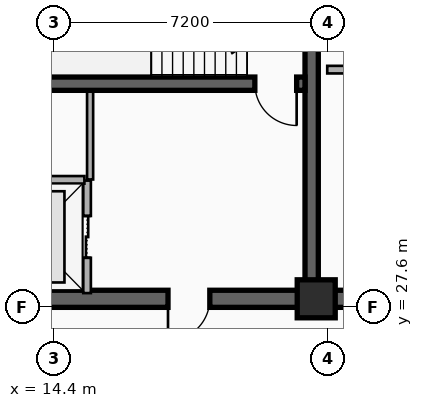
"""IFC4 building model, lengths in metres.
Left out: names, types, materials, properties, quantities, classifications, styles, units other than length and angle.
Written with IfcOpenShell. Run it as: python <this file> out.ifc"""

import sys

from ifc_helpers import new_model, si_unit, direction, frame, frame_2d, origin, origin_2d, place, context, subcontext, project, spatial, rectangle, extrude, element, fill, save


model = new_model("IFC4")
c1 = context("Model", 3, precision=1e-05, world=origin(), true_north=direction((0.0, 1.0)))
c2 = subcontext(c1, "Body", "Model", "MODEL_VIEW")
j1 = project(units=[si_unit("LENGTHUNIT", "METRE"), si_unit("PLANEANGLEUNIT", "RADIAN")], contexts=[c1])
p1 = place(None, origin())
s1 = spatial("IfcSite", under=j1, at=p1, CompositionType="ELEMENT")
p2 = place(p1, origin())
s2 = spatial("IfcBuilding", under=s1, at=p2, CompositionType="ELEMENT")
p3 = place(p2, frame((0.0, 0.0, 218.4)))
s3 = spatial("IfcBuildingStorey", under=s2, at=p3, CompositionType="ELEMENT", Elevation=218.4)
p4 = place(p3, frame((21.18, 27.82, 0.0), z_axis=(0.0, 0.0, 1.0), x_axis=(-1.0, 0.0, 0.0)))
e1 = element("IfcWall", 1, at=p4, inside=s3, PredefinedType="SHEAR", context=c2, shape_type="SweptSolid", body=[
    extrude(rectangle(XDim=9.03, YDim=0.45, at=frame_2d((4.515, 0.0))), origin(), (0.0, 0.0, 1.0), 3.6),
])
p5 = place(p4, frame((2.68, 0.0, 0.0)))
e2 = element("IfcOpeningElement", 2, at=p5, cuts=e1, PredefinedType="OPENING", context=c2, shape_type="SweptSolid", body=[
    extrude(rectangle(XDim=1.1, YDim=2.15, at=frame_2d((0.55, 1.075))), frame((0.0, 0.235, 0.0), z_axis=(0.0, -1.0, 0.0), x_axis=(1.0, 0.0, 0.0)), (0.0, 0.0, 1.0), 0.47),
])
p6 = place(p3, frame((33.15, 27.82, 0.0), z_axis=(0.0, 0.0, 1.0), x_axis=(-1.0, 0.0, 0.0)))
e3 = element("IfcWall", 3, at=p6, inside=s3, PredefinedType="SHEAR", context=c2, shape_type="SweptSolid", body=[
    extrude(rectangle(XDim=11.97, YDim=0.45, at=frame_2d((5.985, 0.0))), origin(), (0.0, 0.0, 1.0), 3.6),
])
p7 = place(p6, frame((6.1, 0.0, 0.0)))
e4 = element("IfcOpeningElement", 4, at=p7, cuts=e3, PredefinedType="OPENING", context=c2, shape_type="SweptSolid", body=[
    extrude(rectangle(XDim=1.6, YDim=2.2, at=frame_2d((0.8, 1.1))), frame((0.0, 0.235, 0.0), z_axis=(0.0, -1.0, 0.0), x_axis=(1.0, 0.0, 0.0)), (0.0, 0.0, 1.0), 0.47),
])
p8 = place(p3, frame((21.18, 28.045, 0.0), z_axis=(0.0, 0.0, 1.0), x_axis=(0.0, 1.0, 0.0)))
e5 = element("IfcWall", 5, at=p8, inside=s3, PredefinedType="SHEAR", context=c2, shape_type="SweptSolid", body=[
    extrude(rectangle(XDim=8.78, YDim=0.35, at=frame_2d((4.39, 0.0))), origin(), (0.0, 0.0, 1.0), 3.6),
])
p9 = place(p3, frame((21.005, 33.48, 0.0), z_axis=(0.0, 0.0, 1.0), x_axis=(-1.0, 0.0, 0.0)))
e6 = element("IfcWall", 6, at=p9, inside=s3, PredefinedType="SHEAR", context=c2, shape_type="SweptSolid", body=[
    extrude(rectangle(XDim=8.63, YDim=0.35, at=frame_2d((4.315, 0.0))), origin(), (0.0, 0.0, 1.0), 3.6),
])
p10 = place(p9, frame((0.22, 0.0, 0.0)))
e7 = element("IfcOpeningElement", 7, at=p10, cuts=e6, PredefinedType="OPENING", context=c2, shape_type="SweptSolid", body=[
    extrude(rectangle(XDim=1.1, YDim=2.15, at=frame_2d((0.55, 1.075))), frame((0.0, 0.185, 0.0), z_axis=(0.0, -1.0, 0.0), x_axis=(1.0, 0.0, 0.0)), (0.0, 0.0, 1.0), 0.37),
])
p11 = place(p3, frame((21.3, 27.82, 0.0), z_axis=(0.0, 0.0, 1.0), x_axis=(1.0, 0.0, 0.0)))
e8 = element("IfcColumn", 8, at=p11, inside=s3, PredefinedType="COLUMN", context=c2, shape_type="SweptSolid", body=[
    extrude(rectangle(XDim=1.0, YDim=1.0, at=origin_2d()), origin(), (0.0, 0.0, 1.0), 3.6),
])
p12 = place(p3, frame((15.27, 27.97, 0.0), z_axis=(0.0, 0.0, 1.0), x_axis=(0.0, 1.0, 0.0)))
e9 = element("IfcWall", 9, at=p12, inside=s3, PredefinedType="PARTITIONING", context=c2, shape_type="SweptSolid", body=[
    extrude(rectangle(XDim=2.96, YDim=0.2, at=frame_2d((1.48, 0.0))), origin(), (0.0, 0.0, 1.0), 2.41),
])
p13 = place(p12, frame((0.93, 0.0, 0.0)))
e10 = element("IfcOpeningElement", 10, at=p13, cuts=e9, PredefinedType="OPENING", context=c2, shape_type="SweptSolid", body=[
    extrude(rectangle(XDim=1.1, YDim=2.15, at=frame_2d((0.55, 1.075))), frame((0.0, 0.11, 0.0), z_axis=(0.0, -1.0, 0.0), x_axis=(1.0, 0.0, 0.0)), (0.0, 0.0, 1.0), 0.22),
])
p14 = place(p3, frame((12.45, 30.95, 0.0), z_axis=(0.0, 0.0, 1.0), x_axis=(1.0, 0.0, 0.0)))
e11 = element("IfcWall", 11, at=p14, inside=s3, PredefinedType="PARTITIONING", context=c2, shape_type="SweptSolid", body=[
    extrude(rectangle(XDim=2.75, YDim=0.2, at=frame_2d((1.375, 0.0))), origin(), (0.0, 0.0, 1.0), 2.41),
])
p15 = place(p3, frame((21.59, 33.85, 0.0), z_axis=(0.0, 0.0, 1.0), x_axis=(1.0, 0.0, 0.0)))
e12 = element("IfcWall", 12, at=p15, inside=s3, PredefinedType="PARTITIONING", context=c2, shape_type="SweptSolid", body=[
    extrude(rectangle(XDim=1.97, YDim=0.2, at=frame_2d((0.985, 0.0))), origin(), (0.0, 0.0, 1.0), 2.41),
])
p16 = place(p3, frame((15.35, 30.96, 0.0), z_axis=(0.0, 0.0, 1.0), x_axis=(0.0, 1.0, 0.0)))
e13 = element("IfcWall", 13, at=p16, inside=s3, PredefinedType="PARTITIONING", context=c2, shape_type="SweptSolid", body=[
    extrude(rectangle(XDim=2.31, YDim=0.16, at=frame_2d((1.155, 0.0))), origin(), (0.0, 0.0, 1.0), 3.34),
])
p17 = place(p13, origin())
e14 = element("IfcDoor", 14, at=p17, inside=s3, OperationType="DOUBLE_DOOR_SLIDING", PredefinedType="DOOR", context=c2, shape_type="SweptSolid", body=[
    extrude(rectangle(XDim=1.1, YDim=2.15, at=frame_2d((0.55, 1.075))), frame((0.0, 0.025, 0.0), z_axis=(0.0, -1.0, 0.0), x_axis=(1.0, 0.0, 0.0)), (0.0, 0.0, 1.0), 0.05),
])
fill(e10, e14)
p18 = place(p10, origin())
e15 = element("IfcDoor", 15, at=p18, inside=s3, OperationType="SINGLE_SWING_LEFT", PredefinedType="DOOR", context=c2, shape_type="SweptSolid", body=[
    extrude(rectangle(XDim=1.1, YDim=2.15, at=frame_2d((0.55, 1.075))), frame((0.0, 0.025, 0.0), z_axis=(0.0, -1.0, 0.0), x_axis=(1.0, 0.0, 0.0)), (0.0, 0.0, 1.0), 0.05),
])
fill(e7, e15)
p19 = place(p5, origin())
e16 = element("IfcDoor", 16, at=p19, inside=s3, OperationType="SINGLE_SWING_RIGHT", PredefinedType="DOOR", context=c2, shape_type="SweptSolid", body=[
    extrude(rectangle(XDim=1.1, YDim=2.15, at=frame_2d((0.55, 1.075))), frame((0.0, 0.025, 0.0), z_axis=(0.0, -1.0, 0.0), x_axis=(1.0, 0.0, 0.0)), (0.0, 0.0, 1.0), 0.05),
])
fill(e2, e16)
save(model, sys.argv[1])
